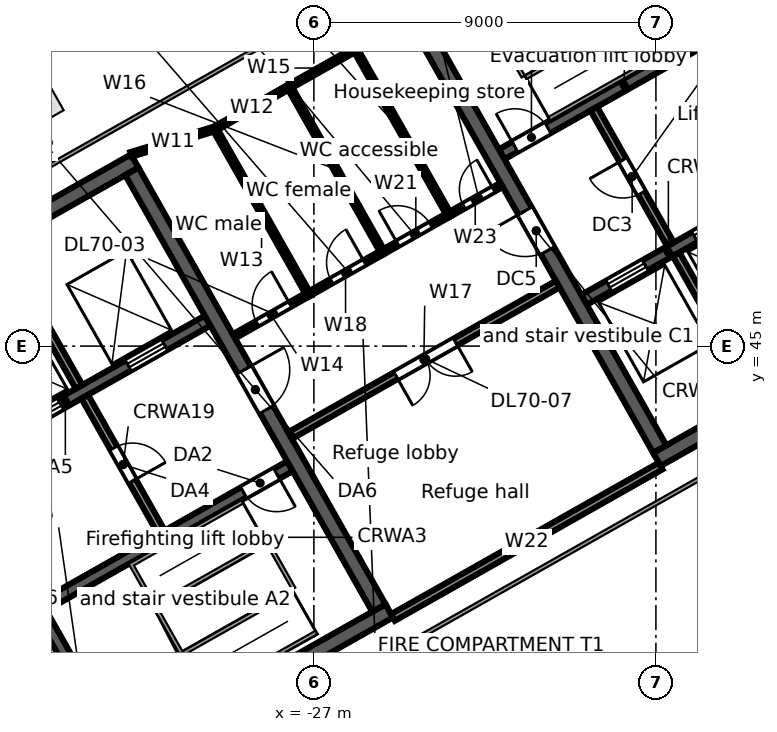
"""IFC4 building model, lengths in metres.
Left out: names, types, materials, properties, quantities, classifications, styles, units other than length and angle.
Written with IfcOpenShell. Run it as: python <this file> out.ifc"""

import sys

from ifc_helpers import new_model, si_unit, direction, frame, frame_2d, origin, origin_2d, place, context, subcontext, project, spatial, rectangle, extrude, element, fill, save


model = new_model("IFC4")
c1 = context("Model", 3, precision=1e-05, world=origin(), true_north=direction((0.0, 1.0)))
c2 = subcontext(c1, "Body", "Model", "MODEL_VIEW")
j1 = project(units=[si_unit("LENGTHUNIT", "METRE"), si_unit("PLANEANGLEUNIT", "RADIAN")], contexts=[c1])
p1 = place(None, origin())
s1 = spatial("IfcSite", under=j1, at=p1, CompositionType="ELEMENT")
p2 = place(p1, origin())
s2 = spatial("IfcBuilding", under=s1, at=p2, CompositionType="ELEMENT")
p3 = place(p2, frame((0.0, 0.0, 312.1)))
s3 = spatial("IfcBuildingStorey", under=s2, at=p3, CompositionType="ELEMENT", Elevation=312.1)
p4 = place(p3, frame((-34.334, 51.414, 0.0), z_axis=(0.0, 0.0, 1.0), x_axis=(-0.87035569594, -0.492423560103, 0.0)))
e1 = element("IfcColumn", 1, at=p4, inside=s3, PredefinedType="COLUMN", context=c2, shape_type="SweptSolid", body=[
    extrude(rectangle(XDim=1.1, YDim=1.1, at=origin_2d()), origin(), (0.0, 0.0, 1.0), 4.4),
])
p5 = place(p3, frame((-39.813, 29.662, 0.0), z_axis=(0.0, 0.0, 1.0), x_axis=(0.870350116061, 0.492433422375, 0.0)))
e2 = element("IfcWall", 2, at=p5, inside=s3, PredefinedType="SOLIDWALL", context=c2, shape_type="SweptSolid", body=[
    extrude(rectangle(XDim=17.0, YDim=0.4, at=frame_2d((8.5, 0.0))), origin(), (0.0, 0.0, 1.0), 4.12),
])
p6 = place(p5, frame((7.2, 0.0, 0.0)))
e3 = element("IfcOpeningElement", 3, at=p6, cuts=e2, PredefinedType="OPENING", context=c2, shape_type="SweptSolid", body=[
    extrude(rectangle(XDim=1.2, YDim=2.1, at=frame_2d((0.6, 1.05))), frame((0.0, 0.21, 0.0), z_axis=(0.0, -1.0, 0.0), x_axis=(1.0, 0.0, 0.0)), (0.0, 0.0, 1.0), 0.42),
])
p7 = place(p3, frame((-34.245, 38.097, 0.0), z_axis=(0.0, 0.0, 1.0), x_axis=(0.870356351998, 0.492422400523, 0.0)))
e4 = element("IfcWall", 4, at=p7, inside=s3, PredefinedType="SOLIDWALL", context=c2, shape_type="SweptSolid", body=[
    extrude(rectangle(XDim=7.6, YDim=0.3, at=frame_2d((3.8, 0.0))), origin(), (0.0, 0.0, 1.0), 4.12),
])
p8 = place(p7, frame((6.2, 0.0, 0.0)))
e5 = element("IfcOpeningElement", 5, at=p8, cuts=e4, PredefinedType="OPENING", context=c2, shape_type="SweptSolid", body=[
    extrude(rectangle(XDim=1.0, YDim=2.1, at=frame_2d((0.5, 1.05))), frame((0.0, 0.16, 0.0), z_axis=(0.0, -1.0, 0.0), x_axis=(1.0, 0.0, 0.0)), (0.0, 0.0, 1.0), 0.32),
])
p9 = place(p3, frame((-37.282, 41.435, 0.0), z_axis=(0.0, 0.0, 1.0), x_axis=(0.870361315115, 0.492413628113, 0.0)))
e6 = element("IfcWall", 6, at=p9, inside=s3, PredefinedType="SOLIDWALL", context=c2, shape_type="SweptSolid", body=[
    extrude(rectangle(XDim=8.6, YDim=0.3, at=frame_2d((4.3, 0.0))), origin(), (0.0, 0.0, 1.0), 4.12),
])
p10 = place(p9, frame((0.65, 0.0, 0.0)))
e7 = element("IfcOpeningElement", 7, at=p10, cuts=e6, PredefinedType="OPENING", context=c2, shape_type="SweptSolid", body=[
    extrude(rectangle(XDim=1.1, YDim=2.1, at=frame_2d((0.55, 1.05))), frame((0.0, 0.16, 0.0), z_axis=(0.0, -1.0, 0.0), x_axis=(1.0, 0.0, 0.0)), (0.0, 0.0, 1.0), 0.32),
])
p11 = place(p9, frame((3.05, 0.0, 0.0)))
e8 = element("IfcOpeningElement", 8, at=p11, cuts=e6, PredefinedType="OPENING", context=c2, shape_type="SweptSolid", body=[
    extrude(rectangle(XDim=1.1, YDim=2.1, at=frame_2d((0.55, 1.05))), frame((0.0, 0.16, 0.0), z_axis=(0.0, -1.0, 0.0), x_axis=(1.0, 0.0, 0.0)), (0.0, 0.0, 1.0), 0.32),
])
p12 = place(p9, frame((6.2, 0.0, 0.0)))
e9 = element("IfcOpeningElement", 9, at=p12, cuts=e6, PredefinedType="OPENING", context=c2, shape_type="SweptSolid", body=[
    extrude(rectangle(XDim=1.1, YDim=2.1, at=frame_2d((0.55, 1.05))), frame((0.0, 0.16, 0.0), z_axis=(0.0, -1.0, 0.0), x_axis=(1.0, 0.0, 0.0)), (0.0, 0.0, 1.0), 0.32),
])
p13 = place(p3, frame((-46.51, 41.499, 0.0), z_axis=(0.0, 0.0, 1.0), x_axis=(0.870356271124, 0.492422543467, 0.0)))
e10 = element("IfcWall", 10, at=p13, inside=s3, PredefinedType="SOLIDWALL", context=c2, shape_type="SweptSolid", body=[
    extrude(rectangle(XDim=17.0, YDim=0.4, at=frame_2d((8.5, 0.0))), origin(), (0.0, 0.0, 1.0), 4.12),
])
p14 = place(p3, frame((-34.171, 37.967, 0.0), z_axis=(0.0, 0.0, 1.0), x_axis=(0.492422543467, -0.870356271124, 0.0)))
e11 = element("IfcWall", 11, at=p14, inside=s3, PredefinedType="SOLIDWALL", context=c2, shape_type="SweptSolid", body=[
    extrude(rectangle(XDim=4.25, YDim=0.3, at=frame_2d((2.125, 0.0))), origin(), (0.0, 0.0, 1.0), 4.12),
])
p15 = place(p3, frame((-33.031, 43.667, 0.0), z_axis=(0.0, 0.0, 1.0), x_axis=(0.492408451753, -0.87036424366, 0.0)))
e12 = element("IfcWall", 12, at=p15, inside=s3, PredefinedType="PARTITIONING", context=c2, shape_type="SweptSolid", body=[
    extrude(rectangle(XDim=4.1, YDim=0.2, at=frame_2d((2.05, 0.0))), origin(), (0.0, 0.0, 1.0), 4.12),
])
p16 = place(p15, frame((1.55, 0.0, 0.0)))
e13 = element("IfcOpeningElement", 13, at=p16, cuts=e12, PredefinedType="OPENING", context=c2, shape_type="SweptSolid", body=[
    extrude(rectangle(XDim=1.0, YDim=2.1, at=frame_2d((0.5, 1.05))), frame((0.0, 0.11, 0.0), z_axis=(0.0, -1.0, 0.0), x_axis=(1.0, 0.0, 0.0)), (0.0, 0.0, 1.0), 0.22),
])
p17 = place(p3, frame((-35.271, 47.628, 0.0), z_axis=(0.0, 0.0, 1.0), x_axis=(0.492422543467, -0.870356271124, 0.0)))
e14 = element("IfcWall", 14, at=p17, inside=s3, PredefinedType="SOLIDWALL", context=c2, shape_type="SweptSolid", body=[
    extrude(rectangle(XDim=4.25, YDim=0.2, at=frame_2d((2.125, 0.0))), origin(), (0.0, 0.0, 1.0), 4.12),
])
p18 = place(p3, frame((-31.79, 49.597, 0.0), z_axis=(0.0, 0.0, 1.0), x_axis=(0.492421663121, -0.870356769198, 0.0)))
e15 = element("IfcWall", 15, at=p18, inside=s3, PredefinedType="SOLIDWALL", context=c2, shape_type="SweptSolid", body=[
    extrude(rectangle(XDim=13.2, YDim=0.4, at=frame_2d((6.6, 0.0))), origin(), (0.0, 0.0, 1.0), 4.12),
])
p19 = place(p18, frame((6.0, 0.0, 0.0)))
e16 = element("IfcOpeningElement", 16, at=p19, cuts=e15, PredefinedType="OPENING", context=c2, shape_type="SweptSolid", body=[
    extrude(rectangle(XDim=1.2, YDim=2.1, at=frame_2d((0.6, 1.05))), frame((0.0, 0.21, 0.0), z_axis=(0.0, -1.0, 0.0), x_axis=(1.0, 0.0, 0.0)), (0.0, 0.0, 1.0), 0.42),
])
p20 = place(p3, frame((-17.975, 42.017, 0.0), z_axis=(0.0, 0.0, 1.0), x_axis=(0.87034965173, 0.492434243055, 0.0)))
e17 = element("IfcWall", 17, at=p20, inside=s3, PredefinedType="SOLIDWALL", context=c2, shape_type="SweptSolid", body=[
    extrude(rectangle(XDim=15.0, YDim=0.4, at=frame_2d((7.5, 0.0))), origin(), (0.0, 0.0, 1.0), 4.12),
])
p21 = place(p20, frame((6.1, 0.0, 0.0)))
e18 = element("IfcOpeningElement", 18, at=p21, cuts=e17, PredefinedType="OPENING", context=c2, shape_type="SweptSolid", body=[
    extrude(rectangle(XDim=1.2, YDim=2.1, at=frame_2d((0.6, 1.05))), frame((0.0, 0.21, 0.0), z_axis=(0.0, -1.0, 0.0), x_axis=(1.0, 0.0, 0.0)), (0.0, 0.0, 1.0), 0.42),
])
p22 = place(p3, frame((-19.892, 46.218, 0.0), z_axis=(0.0, 0.0, 1.0), x_axis=(0.870341639186, 0.492448404505, 0.0)))
e19 = element("IfcWall", 19, at=p22, inside=s3, PredefinedType="SOLIDWALL", context=c2, shape_type="SweptSolid", body=[
    extrude(rectangle(XDim=5.1, YDim=0.3, at=frame_2d((2.55, 0.0))), origin(), (0.0, 0.0, 1.0), 4.12),
])
p23 = place(p22, frame((0.75, 0.0, 0.0)))
e20 = element("IfcOpeningElement", 20, at=p23, cuts=e19, PredefinedType="OPENING", context=c2, shape_type="SweptSolid", body=[
    extrude(rectangle(XDim=1.1, YDim=2.1, at=frame_2d((0.55, 1.05))), frame((0.0, 0.16, 0.0), z_axis=(0.0, -1.0, 0.0), x_axis=(1.0, 0.0, 0.0)), (0.0, 0.0, 1.0), 0.32),
])
p24 = place(p22, frame((3.35, 0.0, 0.0)))
e21 = element("IfcOpeningElement", 21, at=p24, cuts=e19, PredefinedType="OPENING", context=c2, shape_type="SweptSolid", body=[
    extrude(rectangle(XDim=1.1, YDim=2.1, at=frame_2d((0.55, 1.05))), frame((0.0, 0.16, 0.0), z_axis=(0.0, -1.0, 0.0), x_axis=(1.0, 0.0, 0.0)), (0.0, 0.0, 1.0), 0.32),
])
p25 = place(p3, frame((-22.059, 50.047, 0.0), z_axis=(0.0, 0.0, 1.0), x_axis=(0.87035077051, 0.49243226567, 0.0)))
e22 = element("IfcWall", 22, at=p25, inside=s3, PredefinedType="SOLIDWALL", context=c2, shape_type="SweptSolid", body=[
    extrude(rectangle(XDim=7.4, YDim=0.3, at=frame_2d((3.7, 0.0))), origin(), (0.0, 0.0, 1.0), 4.12),
])
p26 = place(p25, frame((0.4, 0.0, 0.0)))
e23 = element("IfcOpeningElement", 23, at=p26, cuts=e22, PredefinedType="OPENING", context=c2, shape_type="SweptSolid", body=[
    extrude(rectangle(XDim=1.0, YDim=2.1, at=frame_2d((0.5, 1.05))), frame((0.0, 0.16, 0.0), z_axis=(0.0, -1.0, 0.0), x_axis=(1.0, 0.0, 0.0)), (0.0, 0.0, 1.0), 0.32),
])
p27 = place(p3, frame((-24.4, 53.779, 0.0), z_axis=(0.0, 0.0, 1.0), x_axis=(0.492421663121, -0.870356769198, 0.0)))
e24 = element("IfcWall", 24, at=p27, inside=s3, PredefinedType="SOLIDWALL", context=c2, shape_type="SweptSolid", body=[
    extrude(rectangle(XDim=13.2, YDim=0.4, at=frame_2d((6.6, 0.0))), origin(), (0.0, 0.0, 1.0), 4.12),
])
p28 = place(p27, frame((6.0, 0.0, 0.0)))
e25 = element("IfcOpeningElement", 25, at=p28, cuts=e24, PredefinedType="OPENING", context=c2, shape_type="SweptSolid", body=[
    extrude(rectangle(XDim=1.2, YDim=2.1, at=frame_2d((0.6, 1.05))), frame((0.0, 0.21, 0.0), z_axis=(0.0, -1.0, 0.0), x_axis=(1.0, 0.0, 0.0)), (0.0, 0.0, 1.0), 0.42),
])
p29 = place(p3, frame((-17.469, 47.417, 0.0), z_axis=(0.0, 0.0, 1.0), x_axis=(0.492466057713, -0.870331650579, 0.0)))
e26 = element("IfcWall", 26, at=p29, inside=s3, PredefinedType="SOLIDWALL", context=c2, shape_type="SweptSolid", body=[
    extrude(rectangle(XDim=4.25, YDim=0.2, at=frame_2d((2.125, 0.0))), origin(), (0.0, 0.0, 1.0), 4.12),
])
p30 = place(p3, frame((-19.635, 51.246, 0.0), z_axis=(0.0, 0.0, 1.0), x_axis=(0.492408451753, -0.87036424366, 0.0)))
e27 = element("IfcWall", 27, at=p30, inside=s3, PredefinedType="PARTITIONING", context=c2, shape_type="SweptSolid", body=[
    extrude(rectangle(XDim=4.1, YDim=0.2, at=frame_2d((2.05, 0.0))), origin(), (0.0, 0.0, 1.0), 4.12),
])
p31 = place(p30, frame((1.55, 0.0, 0.0)))
e28 = element("IfcOpeningElement", 28, at=p31, cuts=e27, PredefinedType="OPENING", context=c2, shape_type="SweptSolid", body=[
    extrude(rectangle(XDim=1.0, YDim=2.1, at=frame_2d((0.5, 1.05))), frame((0.0, 0.11, 0.0), z_axis=(0.0, -1.0, 0.0), x_axis=(1.0, 0.0, 0.0)), (0.0, 0.0, 1.0), 0.22),
])
p32 = place(p3, frame((-31.812, 50.044, 0.0), z_axis=(0.0, 0.0, 1.0), x_axis=(0.956397612161, 0.292067813107, 0.0)))
e29 = element("IfcWall", 29, at=p32, inside=s3, PredefinedType="PARTITIONING", context=c2, shape_type="SweptSolid", body=[
    extrude(rectangle(XDim=2.305, YDim=0.125, at=frame_2d((1.152, 0.0))), origin(), (0.0, 0.0, 1.0), 4.12),
])
p33 = place(p3, frame((-29.608, 50.717, 0.0), z_axis=(0.0, 0.0, 1.0), x_axis=(0.870332332106, 0.492464853254, 0.0)))
e30 = element("IfcWall", 30, at=p33, inside=s3, PredefinedType="PARTITIONING", context=c2, shape_type="SweptSolid", body=[
    extrude(rectangle(XDim=2.25, YDim=0.125, at=frame_2d((1.125, 0.0))), origin(), (0.0, 0.0, 1.0), 4.12),
])
p34 = place(p3, frame((-29.608, 50.717, 0.0), z_axis=(0.0, 0.0, 1.0), x_axis=(0.492369352746, -0.870386362759, 0.0)))
e31 = element("IfcWall", 31, at=p34, inside=s3, PredefinedType="PARTITIONING", context=c2, shape_type="SweptSolid", body=[
    extrude(rectangle(XDim=5.0, YDim=0.125, at=frame_2d((2.5, 0.0))), origin(), (0.0, 0.0, 1.0), 4.12),
])
p35 = place(p3, frame((-29.104, 45.257, 0.0), z_axis=(0.0, 0.0, 1.0), x_axis=(0.870332332106, 0.492464853254, 0.0)))
e32 = element("IfcWall", 32, at=p35, inside=s3, PredefinedType="PARTITIONING", context=c2, shape_type="SweptSolid", body=[
    extrude(rectangle(XDim=2.25, YDim=0.125, at=frame_2d((1.125, 0.0))), origin(), (0.0, 0.0, 1.0), 4.12),
])
p36 = place(p35, frame((0.7, 0.0, 0.0)))
e33 = element("IfcOpeningElement", 33, at=p36, cuts=e32, PredefinedType="OPENING", context=c2, shape_type="SweptSolid", body=[
    extrude(rectangle(XDim=1.0, YDim=2.1, at=frame_2d((0.5, 1.05))), frame((0.0, 0.073, 0.0), z_axis=(0.0, -1.0, 0.0), x_axis=(1.0, 0.0, 0.0)), (0.0, 0.0, 1.0), 0.145),
])
p37 = place(p3, frame((-27.65, 51.825, 0.0), z_axis=(0.0, 0.0, 1.0), x_axis=(0.870330884088, 0.492467412326, 0.0)))
e34 = element("IfcWall", 34, at=p37, inside=s3, PredefinedType="PARTITIONING", context=c2, shape_type="SweptSolid", body=[
    extrude(rectangle(XDim=2.0, YDim=0.125, at=frame_2d((1.0, 0.0))), origin(), (0.0, 0.0, 1.0), 4.12),
])
p38 = place(p3, frame((-27.65, 51.825, 0.0), z_axis=(0.0, 0.0, 1.0), x_axis=(0.492369352746, -0.870386362759, 0.0)))
e35 = element("IfcWall", 35, at=p38, inside=s3, PredefinedType="PARTITIONING", context=c2, shape_type="SweptSolid", body=[
    extrude(rectangle(XDim=5.0, YDim=0.125, at=frame_2d((2.5, 0.0))), origin(), (0.0, 0.0, 1.0), 4.12),
])
p39 = place(p3, frame((-27.627, 42.646, 0.0), z_axis=(0.0, 0.0, 1.0), x_axis=(0.870370568162, 0.492397272614, 0.0)))
e36 = element("IfcWall", 36, at=p39, inside=s3, PredefinedType="PARTITIONING", context=c2, shape_type="SweptSolid", body=[
    extrude(rectangle(XDim=8.091, YDim=0.2, at=frame_2d((4.045, 0.0))), origin(), (0.0, 0.0, 1.0), 3.392),
])
p40 = place(p39, frame((3.2, 0.0, 0.0)))
e37 = element("IfcOpeningElement", 37, at=p40, cuts=e36, PredefinedType="OPENING", context=c2, shape_type="SweptSolid", body=[
    extrude(rectangle(XDim=1.8, YDim=2.1, at=frame_2d((0.9, 1.05))), frame((0.0, 0.11, 0.0), z_axis=(0.0, -1.0, 0.0), x_axis=(1.0, 0.0, 0.0)), (0.0, 0.0, 1.0), 0.22),
])
p41 = place(p3, frame((-27.146, 46.365, 0.0), z_axis=(0.0, 0.0, 1.0), x_axis=(0.870332332106, 0.492464853254, 0.0)))
e38 = element("IfcWall", 38, at=p41, inside=s3, PredefinedType="PARTITIONING", context=c2, shape_type="SweptSolid", body=[
    extrude(rectangle(XDim=2.25, YDim=0.125, at=frame_2d((1.125, 0.0))), origin(), (0.0, 0.0, 1.0), 4.12),
])
p42 = place(p41, frame((0.7, 0.0, 0.0)))
e39 = element("IfcOpeningElement", 39, at=p42, cuts=e38, PredefinedType="OPENING", context=c2, shape_type="SweptSolid", body=[
    extrude(rectangle(XDim=1.0, YDim=2.1, at=frame_2d((0.5, 1.05))), frame((0.0, 0.073, 0.0), z_axis=(0.0, -1.0, 0.0), x_axis=(1.0, 0.0, 0.0)), (0.0, 0.0, 1.0), 0.145),
])
p43 = place(p3, frame((-25.909, 52.81, 0.0), z_axis=(0.0, 0.0, 1.0), x_axis=(0.492369352746, -0.870386362759, 0.0)))
e40 = element("IfcWall", 40, at=p43, inside=s3, PredefinedType="PARTITIONING", context=c2, shape_type="SweptSolid", body=[
    extrude(rectangle(XDim=5.0, YDim=0.125, at=frame_2d((2.5, 0.0))), origin(), (0.0, 0.0, 1.0), 4.12),
])
p44 = place(p3, frame((-25.188, 47.473, 0.0), z_axis=(0.0, 0.0, 1.0), x_axis=(0.870330884088, 0.492467412326, 0.0)))
e41 = element("IfcWall", 41, at=p44, inside=s3, PredefinedType="PARTITIONING", context=c2, shape_type="SweptSolid", body=[
    extrude(rectangle(XDim=2.0, YDim=0.125, at=frame_2d((1.0, 0.0))), origin(), (0.0, 0.0, 1.0), 4.12),
])
p45 = place(p44, frame((0.45, 0.0, 0.0)))
e42 = element("IfcOpeningElement", 42, at=p45, cuts=e41, PredefinedType="OPENING", context=c2, shape_type="SweptSolid", body=[
    extrude(rectangle(XDim=1.0, YDim=2.1, at=frame_2d((0.5, 1.05))), frame((0.0, 0.073, 0.0), z_axis=(0.0, -1.0, 0.0), x_axis=(1.0, 0.0, 0.0)), (0.0, 0.0, 1.0), 0.145),
])
p46 = place(p3, frame((-24.919, 37.859, 0.0), z_axis=(0.0, 0.0, 1.0), x_axis=(0.870357635969, 0.492420131098, 0.0)))
e43 = element("IfcWall", 43, at=p46, inside=s3, PredefinedType="PARTITIONING", context=c2, shape_type="SweptSolid", body=[
    extrude(rectangle(XDim=8.091, YDim=0.2, at=frame_2d((4.045, 0.0))), origin(), (0.0, 0.0, 1.0), 3.392),
])
p47 = place(p3, frame((-23.447, 48.458, 0.0), z_axis=(0.0, 0.0, 1.0), x_axis=(0.870528540927, 0.492117932443, 0.0)))
e44 = element("IfcWall", 44, at=p47, inside=s3, PredefinedType="PARTITIONING", context=c2, shape_type="SweptSolid", body=[
    extrude(rectangle(XDim=1.591, YDim=0.125, at=frame_2d((0.795, 0.0))), origin(), (0.0, 0.0, 1.0), 3.392),
])
p48 = place(p47, frame((0.45, 0.0, 0.0)))
e45 = element("IfcOpeningElement", 45, at=p48, cuts=e44, PredefinedType="OPENING", context=c2, shape_type="SweptSolid", body=[
    extrude(rectangle(XDim=0.9, YDim=2.1, at=frame_2d((0.45, 1.05))), frame((0.0, 0.073, 0.0), z_axis=(0.0, -1.0, 0.0), x_axis=(1.0, 0.0, 0.0)), (0.0, 0.0, 1.0), 0.145),
])
p49 = place(p11, origin())
e46 = element("IfcDoor", 46, at=p49, inside=s3, OperationType="DOUBLE_DOOR_SLIDING", PredefinedType="DOOR", context=c2, shape_type="SweptSolid", body=[
    extrude(rectangle(XDim=1.1, YDim=2.1, at=frame_2d((0.55, 1.05))), frame((0.0, 0.025, 0.0), z_axis=(0.0, -1.0, 0.0), x_axis=(1.0, 0.0, 0.0)), (0.0, 0.0, 1.0), 0.05),
])
fill(e8, e46)
p50 = place(p12, origin())
e47 = element("IfcDoor", 47, at=p50, inside=s3, OperationType="DOUBLE_DOOR_SLIDING", PredefinedType="DOOR", context=c2, shape_type="SweptSolid", body=[
    extrude(rectangle(XDim=1.1, YDim=2.1, at=frame_2d((0.55, 1.05))), frame((0.0, 0.025, 0.0), z_axis=(0.0, -1.0, 0.0), x_axis=(1.0, 0.0, 0.0)), (0.0, 0.0, 1.0), 0.05),
])
fill(e9, e47)
p51 = place(p8, frame((1.0, 0.0, 0.0), z_axis=(0.0, 0.0, 1.0), x_axis=(-1.0, 0.0, 0.0)))
e48 = element("IfcDoor", 48, at=p51, inside=s3, OperationType="SINGLE_SWING_LEFT", PredefinedType="DOOR", context=c2, shape_type="SweptSolid", body=[
    extrude(rectangle(XDim=1.0, YDim=2.1, at=frame_2d((0.5, 1.05))), frame((0.0, 0.025, 0.0), z_axis=(0.0, -1.0, 0.0), x_axis=(1.0, 0.0, 0.0)), (0.0, 0.0, 1.0), 0.05),
])
fill(e5, e48)
p52 = place(p16, origin())
e49 = element("IfcDoor", 49, at=p52, inside=s3, OperationType="SINGLE_SWING_RIGHT", PredefinedType="DOOR", context=c2, shape_type="SweptSolid", body=[
    extrude(rectangle(XDim=1.0, YDim=2.1, at=frame_2d((0.5, 1.05))), frame((0.0, 0.025, 0.0), z_axis=(0.0, -1.0, 0.0), x_axis=(1.0, 0.0, 0.0)), (0.0, 0.0, 1.0), 0.05),
])
fill(e13, e49)
p53 = place(p19, origin())
e50 = element("IfcDoor", 50, at=p53, inside=s3, OperationType="SINGLE_SWING_LEFT", PredefinedType="DOOR", context=c2, shape_type="SweptSolid", body=[
    extrude(rectangle(XDim=1.2, YDim=2.1, at=frame_2d((0.6, 1.05))), frame((0.0, 0.025, 0.0), z_axis=(0.0, -1.0, 0.0), x_axis=(1.0, 0.0, 0.0)), (0.0, 0.0, 1.0), 0.05),
])
fill(e16, e50)
p54 = place(p23, origin())
e51 = element("IfcDoor", 51, at=p54, inside=s3, OperationType="DOUBLE_DOOR_SLIDING", PredefinedType="DOOR", context=c2, shape_type="SweptSolid", body=[
    extrude(rectangle(XDim=1.1, YDim=2.1, at=frame_2d((0.55, 1.05))), frame((0.0, 0.025, 0.0), z_axis=(0.0, -1.0, 0.0), x_axis=(1.0, 0.0, 0.0)), (0.0, 0.0, 1.0), 0.05),
])
fill(e20, e51)
p55 = place(p24, origin())
e52 = element("IfcDoor", 52, at=p55, inside=s3, OperationType="DOUBLE_DOOR_SLIDING", PredefinedType="DOOR", context=c2, shape_type="SweptSolid", body=[
    extrude(rectangle(XDim=1.1, YDim=2.1, at=frame_2d((0.55, 1.05))), frame((0.0, 0.025, 0.0), z_axis=(0.0, -1.0, 0.0), x_axis=(1.0, 0.0, 0.0)), (0.0, 0.0, 1.0), 0.05),
])
fill(e21, e52)
p56 = place(p26, origin())
e53 = element("IfcDoor", 53, at=p56, inside=s3, OperationType="SINGLE_SWING_LEFT", PredefinedType="DOOR", context=c2, shape_type="SweptSolid", body=[
    extrude(rectangle(XDim=1.0, YDim=2.1, at=frame_2d((0.5, 1.05))), frame((0.0, 0.025, 0.0), z_axis=(0.0, -1.0, 0.0), x_axis=(1.0, 0.0, 0.0)), (0.0, 0.0, 1.0), 0.05),
])
fill(e23, e53)
p57 = place(p31, frame((1.0, 0.0, 0.0), z_axis=(0.0, 0.0, 1.0), x_axis=(-1.0, 0.0, 0.0)))
e54 = element("IfcDoor", 54, at=p57, inside=s3, OperationType="SINGLE_SWING_RIGHT", PredefinedType="DOOR", context=c2, shape_type="SweptSolid", body=[
    extrude(rectangle(XDim=1.0, YDim=2.1, at=frame_2d((0.5, 1.05))), frame((0.0, 0.025, 0.0), z_axis=(0.0, -1.0, 0.0), x_axis=(1.0, 0.0, 0.0)), (0.0, 0.0, 1.0), 0.05),
])
fill(e28, e54)
p58 = place(p28, frame((1.2, 0.0, 0.0), z_axis=(0.0, 0.0, 1.0), x_axis=(-1.0, 0.0, 0.0)))
e55 = element("IfcDoor", 55, at=p58, inside=s3, OperationType="SINGLE_SWING_RIGHT", PredefinedType="DOOR", context=c2, shape_type="SweptSolid", body=[
    extrude(rectangle(XDim=1.2, YDim=2.1, at=frame_2d((0.6, 1.05))), frame((0.0, 0.025, 0.0), z_axis=(0.0, -1.0, 0.0), x_axis=(1.0, 0.0, 0.0)), (0.0, 0.0, 1.0), 0.05),
])
fill(e25, e55)
p59 = place(p36, origin())
e56 = element("IfcDoor", 56, at=p59, inside=s3, OperationType="SINGLE_SWING_RIGHT", PredefinedType="DOOR", context=c2, shape_type="SweptSolid", body=[
    extrude(rectangle(XDim=1.0, YDim=2.1, at=frame_2d((0.5, 1.05))), frame((0.0, 0.025, 0.0), z_axis=(0.0, -1.0, 0.0), x_axis=(1.0, 0.0, 0.0)), (0.0, 0.0, 1.0), 0.05),
])
fill(e33, e56)
p60 = place(p42, origin())
e57 = element("IfcDoor", 57, at=p60, inside=s3, OperationType="SINGLE_SWING_RIGHT", PredefinedType="DOOR", context=c2, shape_type="SweptSolid", body=[
    extrude(rectangle(XDim=1.0, YDim=2.1, at=frame_2d((0.5, 1.05))), frame((0.0, 0.025, 0.0), z_axis=(0.0, -1.0, 0.0), x_axis=(1.0, 0.0, 0.0)), (0.0, 0.0, 1.0), 0.05),
])
fill(e39, e57)
p61 = place(p45, origin())
e58 = element("IfcDoor", 58, at=p61, inside=s3, OperationType="SINGLE_SWING_LEFT", PredefinedType="DOOR", context=c2, shape_type="SweptSolid", body=[
    extrude(rectangle(XDim=1.0, YDim=2.1, at=frame_2d((0.5, 1.05))), frame((0.0, 0.025, 0.0), z_axis=(0.0, -1.0, 0.0), x_axis=(1.0, 0.0, 0.0)), (0.0, 0.0, 1.0), 0.05),
])
fill(e42, e58)
p62 = place(p48, origin())
e59 = element("IfcDoor", 59, at=p62, inside=s3, OperationType="SINGLE_SWING_RIGHT", PredefinedType="DOOR", context=c2, shape_type="SweptSolid", body=[
    extrude(rectangle(XDim=0.9, YDim=2.1, at=frame_2d((0.45, 1.05))), frame((0.0, 0.025, 0.0), z_axis=(0.0, -1.0, 0.0), x_axis=(1.0, 0.0, 0.0)), (0.0, 0.0, 1.0), 0.05),
])
fill(e45, e59)
p63 = place(p40, frame((1.8, 0.0, 0.0), z_axis=(0.0, 0.0, 1.0), x_axis=(-1.0, 0.0, 0.0)))
e60 = element("IfcDoor", 60, at=p63, inside=s3, OperationType="DOUBLE_DOOR_SINGLE_SWING", PredefinedType="DOOR", context=c2, shape_type="SweptSolid", body=[
    extrude(rectangle(XDim=1.8, YDim=2.1, at=frame_2d((0.9, 1.05))), frame((0.0, 0.025, 0.0), z_axis=(0.0, -1.0, 0.0), x_axis=(1.0, 0.0, 0.0)), (0.0, 0.0, 1.0), 0.05),
])
fill(e37, e60)
save(model, sys.argv[1])
